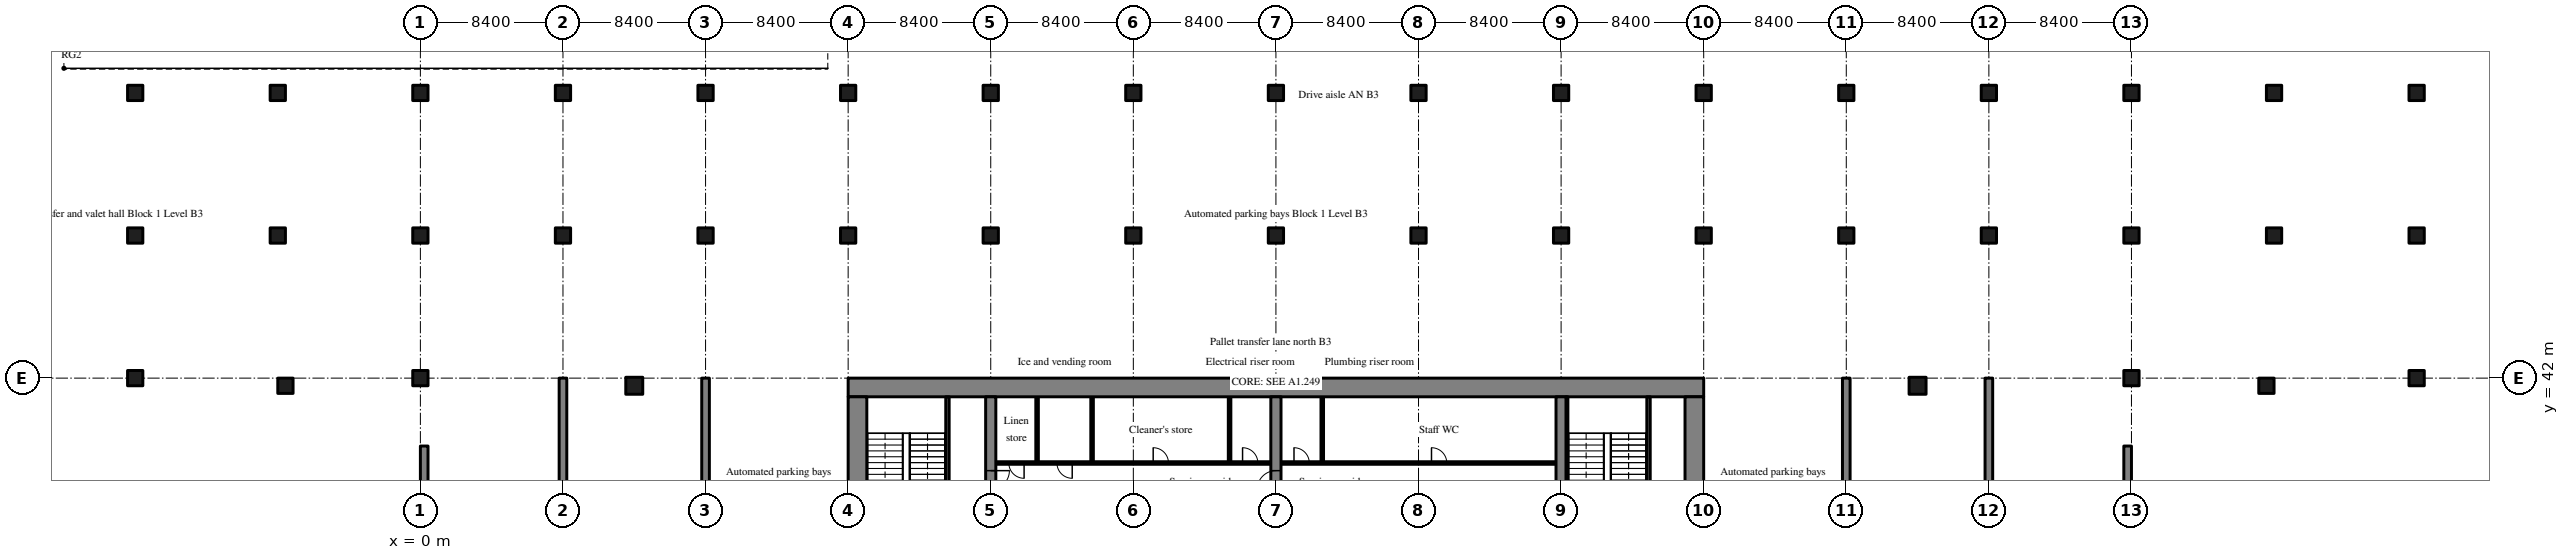
"""IFC4 building model, lengths in metres.
Left out: names, types, materials, properties, quantities, classifications, styles, units other than length and angle.
Written with IfcOpenShell. Run it as: python <this file> out.ifc"""

import sys

from ifc_helpers import new_model, si_unit, direction, frame, frame_2d, origin, origin_2d, place, context, subcontext, project, spatial, rectangle, extrude, source, transform, mapped, element, fill, save


model = new_model("IFC4")
c1 = context("Model", 3, precision=1e-05, world=origin(), true_north=direction((0.0, 1.0)))
c2 = subcontext(c1, "Body", "Model", "MODEL_VIEW")
j1 = project(units=[si_unit("LENGTHUNIT", "METRE"), si_unit("PLANEANGLEUNIT", "RADIAN")], contexts=[c1])
p1 = place(None, origin())
s1 = spatial("IfcSite", under=j1, at=p1, CompositionType="ELEMENT")
p2 = place(p1, origin())
s2 = spatial("IfcBuilding", under=s1, at=p2, CompositionType="ELEMENT")
p3 = place(p2, frame((0.0, 0.0, -13.5)))
s3 = spatial("IfcBuildingStorey", under=s2, at=p3, CompositionType="ELEMENT", Elevation=-13.5)
m1 = source(origin(), c2, "Body", "SweptSolid", [
    extrude(rectangle(XDim=50.4, YDim=1.1, at=frame_2d((25.2, 0.0))), origin(), (0.0, 0.0, 1.0), 4.52),
])
p4 = place(p3, frame((25.2, 41.45, -0.3), z_axis=(0.0, 0.0, 1.0), x_axis=(1.0, 0.0, 0.0)))
e1 = element("IfcWall", 1, at=p4, inside=s3, PredefinedType="SHEAR", context=c2, shape_type="MappedRepresentation", body=[
    mapped(m1, transform((0.0, 0.0, 0.0), scale=1.0)),
])
m2 = source(origin(), c2, "Body", "SweptSolid", [
    extrude(rectangle(XDim=17.8, YDim=1.1, at=frame_2d((8.9, 0.0))), origin(), (0.0, 0.0, 1.0), 4.52),
])
for number, where, z_axis, x_axis in (
    (2, (25.75, 23.1, -0.3), (0.0, 0.0, 1.0), (0.0, 1.0, 0.0)),
    (3, (75.05, 23.1, -0.3), (0.0, 0.0, 1.0), (0.0, 1.0, 0.0)),
):
    element("IfcWall", number, at=place(p3, frame(where, z_axis=z_axis, x_axis=x_axis)), inside=s3, PredefinedType="SHEAR", context=c2, shape_type="MappedRepresentation", body=[
        mapped(m2, transform((0.0, 0.0, 0.0), scale=1.0)),
    ])
m3 = source(origin(), c2, "Body", "SweptSolid", [
    extrude(rectangle(XDim=17.8, YDim=0.6, at=frame_2d((8.9, 0.0))), origin(), (0.0, 0.0, 1.0), 4.52),
])
p5 = place(p3, frame((33.6, 23.1, -0.3), z_axis=(0.0, 0.0, 1.0), x_axis=(0.0, 1.0, 0.0)))
e4 = element("IfcWall", 4, at=p5, inside=s3, PredefinedType="SHEAR", context=c2, shape_type="MappedRepresentation", body=[
    mapped(m3, transform((0.0, 0.0, 0.0), scale=1.0)),
])
m4 = source(origin(), c2, "Body", "SweptSolid", [
    extrude(rectangle(XDim=1.1, YDim=2.1, at=frame_2d((0.55, 1.05))), frame((0.0, 0.31, 0.0), z_axis=(0.0, -1.0, 0.0), x_axis=(1.0, 0.0, 0.0)), (0.0, 0.0, 1.0), 0.62),
])
p6 = place(p5, frame((12.35, 0.0, 0.0)))
e5 = element("IfcOpeningElement", 5, at=p6, cuts=e4, PredefinedType="OPENING", context=c2, shape_type="MappedRepresentation", body=[
    mapped(m4, transform((0.0, 0.0, 0.0), scale=1.0)),
])
p7 = place(p3, frame((50.4, 23.1, -0.3), z_axis=(0.0, 0.0, 1.0), x_axis=(0.0, 1.0, 0.0)))
e6 = element("IfcWall", 6, at=p7, inside=s3, PredefinedType="SHEAR", context=c2, shape_type="MappedRepresentation", body=[
    mapped(m3, transform((0.0, 0.0, 0.0), scale=1.0)),
])
p8 = place(p7, frame((12.35, 0.0, 0.0)))
e7 = element("IfcOpeningElement", 7, at=p8, cuts=e6, PredefinedType="OPENING", context=c2, shape_type="MappedRepresentation", body=[
    mapped(m4, transform((0.0, 0.0, 0.0), scale=1.0)),
])
p9 = place(p3, frame((67.2, 23.1, -0.3), z_axis=(0.0, 0.0, 1.0), x_axis=(0.0, 1.0, 0.0)))
e8 = element("IfcWall", 8, at=p9, inside=s3, PredefinedType="SHEAR", context=c2, shape_type="MappedRepresentation", body=[
    mapped(m3, transform((0.0, 0.0, 0.0), scale=1.0)),
])
m5 = source(origin(), c2, "Body", "SweptSolid", [
    extrude(rectangle(XDim=16.0, YDim=0.45, at=frame_2d((8.0, 0.0))), origin(), (0.0, 0.0, 1.0), 4.52),
])
p10 = place(p3, frame((0.225, 22.0, -0.3), z_axis=(0.0, 0.0, 1.0), x_axis=(0.0, 1.0, 0.0)))
e9 = element("IfcWall", 9, at=p10, inside=s3, PredefinedType="SHEAR", context=c2, shape_type="MappedRepresentation", body=[
    mapped(m5, transform((0.0, 0.0, 0.0), scale=1.0)),
])
m6 = source(origin(), c2, "Body", "SweptSolid", [
    extrude(rectangle(XDim=20.0, YDim=0.45, at=frame_2d((10.0, 0.0))), origin(), (0.0, 0.0, 1.0), 4.52),
])
for number, where, z_axis, x_axis in (
    (10, (8.4, 22.0, -0.3), (0.0, 0.0, 1.0), (0.0, 1.0, 0.0)),
    (11, (16.8, 22.0, -0.3), (0.0, 0.0, 1.0), (0.0, 1.0, 0.0)),
    (12, (84.0, 22.0, -0.3), (0.0, 0.0, 1.0), (0.0, 1.0, 0.0)),
    (13, (92.4, 22.0, -0.3), (0.0, 0.0, 1.0), (0.0, 1.0, 0.0)),
):
    element("IfcWall", number, at=place(p3, frame(where, z_axis=z_axis, x_axis=x_axis)), inside=s3, PredefinedType="SHEAR", context=c2, shape_type="MappedRepresentation", body=[
        mapped(m6, transform((0.0, 0.0, 0.0), scale=1.0)),
    ])
p11 = place(p3, frame((100.575, 22.0, -0.3), z_axis=(0.0, 0.0, 1.0), x_axis=(0.0, 1.0, 0.0)))
e14 = element("IfcWall", 14, at=p11, inside=s3, PredefinedType="SHEAR", context=c2, shape_type="MappedRepresentation", body=[
    mapped(m5, transform((0.0, 0.0, 0.0), scale=1.0)),
])
m7 = source(origin(), c2, "Body", "SweptSolid", [
    extrude(rectangle(XDim=1.0, YDim=1.0, at=origin_2d()), origin(), (0.0, 0.0, 1.0), 4.52),
])
for number, where, z_axis, x_axis in (
    (15, (12.6, 41.55, -0.3), (0.0, 0.0, 1.0), (1.0, 0.0, 0.0)),
    (16, (88.2, 41.55, -0.3), (0.0, 0.0, 1.0), (1.0, 0.0, 0.0)),
):
    element("IfcColumn", number, at=place(p3, frame(where, z_axis=z_axis, x_axis=x_axis)), inside=s3, PredefinedType="COLUMN", context=c2, shape_type="MappedRepresentation", body=[
        mapped(m7, transform((0.0, 0.0, 0.0), scale=1.0)),
    ])
m8 = source(origin(), c2, "Body", "SweptSolid", [
    extrude(rectangle(XDim=0.9, YDim=0.9, at=origin_2d()), origin(), (0.0, 0.0, 1.0), 4.52),
])
for number, where, z_axis, x_axis in (
    (17, (-7.95, 41.55, -0.3), (0.0, 0.0, 1.0), (1.0, 0.0, 0.0)),
    (18, (108.75, 41.55, -0.3), (0.0, 0.0, 1.0), (1.0, 0.0, 0.0)),
    (19, (-16.8, 42.0, -0.3), (0.0, 0.0, 1.0), (1.0, 0.0, 0.0)),
    (20, (-16.8, 50.4, -0.3), (0.0, 0.0, 1.0), (1.0, 0.0, 0.0)),
    (21, (-16.8, 58.8, -0.3), (0.0, 0.0, 1.0), (1.0, 0.0, 0.0)),
    (22, (-8.4, 50.4, -0.3), (0.0, 0.0, 1.0), (1.0, 0.0, 0.0)),
    (23, (-8.4, 58.8, -0.3), (0.0, 0.0, 1.0), (1.0, 0.0, 0.0)),
    (24, (0.0, 42.0, -0.3), (0.0, 0.0, 1.0), (1.0, 0.0, 0.0)),
    (25, (0.0, 50.4, -0.3), (0.0, 0.0, 1.0), (1.0, 0.0, 0.0)),
    (26, (0.0, 58.8, -0.3), (0.0, 0.0, 1.0), (1.0, 0.0, 0.0)),
    (27, (8.4, 50.4, -0.3), (0.0, 0.0, 1.0), (1.0, 0.0, 0.0)),
    (28, (8.4, 58.8, -0.3), (0.0, 0.0, 1.0), (1.0, 0.0, 0.0)),
    (29, (16.8, 50.4, -0.3), (0.0, 0.0, 1.0), (1.0, 0.0, 0.0)),
    (30, (16.8, 58.8, -0.3), (0.0, 0.0, 1.0), (1.0, 0.0, 0.0)),
    (31, (25.2, 50.4, -0.3), (0.0, 0.0, 1.0), (1.0, 0.0, 0.0)),
    (32, (25.2, 58.8, -0.3), (0.0, 0.0, 1.0), (1.0, 0.0, 0.0)),
    (33, (33.6, 50.4, -0.3), (0.0, 0.0, 1.0), (1.0, 0.0, 0.0)),
    (34, (33.6, 58.8, -0.3), (0.0, 0.0, 1.0), (1.0, 0.0, 0.0)),
    (35, (42.0, 50.4, -0.3), (0.0, 0.0, 1.0), (1.0, 0.0, 0.0)),
    (36, (42.0, 58.8, -0.3), (0.0, 0.0, 1.0), (1.0, 0.0, 0.0)),
    (37, (50.4, 50.4, -0.3), (0.0, 0.0, 1.0), (1.0, 0.0, 0.0)),
    (38, (50.4, 58.8, -0.3), (0.0, 0.0, 1.0), (1.0, 0.0, 0.0)),
    (39, (58.8, 50.4, -0.3), (0.0, 0.0, 1.0), (1.0, 0.0, 0.0)),
    (40, (58.8, 58.8, -0.3), (0.0, 0.0, 1.0), (1.0, 0.0, 0.0)),
    (41, (67.2, 50.4, -0.3), (0.0, 0.0, 1.0), (1.0, 0.0, 0.0)),
    (42, (67.2, 58.8, -0.3), (0.0, 0.0, 1.0), (1.0, 0.0, 0.0)),
    (43, (75.6, 50.4, -0.3), (0.0, 0.0, 1.0), (1.0, 0.0, 0.0)),
    (44, (75.6, 58.8, -0.3), (0.0, 0.0, 1.0), (1.0, 0.0, 0.0)),
    (45, (84.0, 50.4, -0.3), (0.0, 0.0, 1.0), (1.0, 0.0, 0.0)),
    (46, (84.0, 58.8, -0.3), (0.0, 0.0, 1.0), (1.0, 0.0, 0.0)),
    (47, (92.4, 50.4, -0.3), (0.0, 0.0, 1.0), (1.0, 0.0, 0.0)),
    (48, (92.4, 58.8, -0.3), (0.0, 0.0, 1.0), (1.0, 0.0, 0.0)),
    (49, (100.8, 42.0, -0.3), (0.0, 0.0, 1.0), (1.0, 0.0, 0.0)),
    (50, (100.8, 50.4, -0.3), (0.0, 0.0, 1.0), (1.0, 0.0, 0.0)),
    (51, (100.8, 58.8, -0.3), (0.0, 0.0, 1.0), (1.0, 0.0, 0.0)),
    (52, (109.2, 50.4, -0.3), (0.0, 0.0, 1.0), (1.0, 0.0, 0.0)),
    (53, (109.2, 58.8, -0.3), (0.0, 0.0, 1.0), (1.0, 0.0, 0.0)),
    (54, (117.6, 42.0, -0.3), (0.0, 0.0, 1.0), (1.0, 0.0, 0.0)),
    (55, (117.6, 50.4, -0.3), (0.0, 0.0, 1.0), (1.0, 0.0, 0.0)),
    (56, (117.6, 58.8, -0.3), (0.0, 0.0, 1.0), (1.0, 0.0, 0.0)),
):
    element("IfcColumn", number, at=place(p3, frame(where, z_axis=z_axis, x_axis=x_axis)), inside=s3, PredefinedType="COLUMN", context=c2, shape_type="MappedRepresentation", body=[
        mapped(m8, transform((0.0, 0.0, 0.0), scale=1.0)),
    ])
m9 = source(origin(), c2, "Body", "SweptSolid", [
    extrude(rectangle(XDim=16.2, YDim=0.15, at=frame_2d((8.1, 0.0))), origin(), (0.0, 0.0, 1.0), 4.22),
])
p12 = place(p3, frame((33.9, 37.0, 0.0), z_axis=(0.0, 0.0, 1.0), x_axis=(1.0, 0.0, 0.0)))
e57 = element("IfcWall", 57, at=p12, inside=s3, PredefinedType="PARTITIONING", context=c2, shape_type="MappedRepresentation", body=[
    mapped(m9, transform((0.0, 0.0, 0.0), scale=1.0)),
])
m10 = source(origin(), c2, "Body", "SweptSolid", [
    extrude(rectangle(XDim=0.9, YDim=2.1, at=frame_2d((0.45, 1.05))), frame((0.0, 0.085, 0.0), z_axis=(0.0, -1.0, 0.0), x_axis=(1.0, 0.0, 0.0)), (0.0, 0.0, 1.0), 0.17),
])
p13 = place(p12, frame((0.765, 0.0, 0.0)))
e58 = element("IfcOpeningElement", 58, at=p13, cuts=e57, PredefinedType="OPENING", context=c2, shape_type="MappedRepresentation", body=[
    mapped(m10, transform((0.0, 0.0, 0.0), scale=1.0)),
])
p14 = place(p12, frame((3.6, 0.0, 0.0)))
e59 = element("IfcOpeningElement", 59, at=p14, cuts=e57, PredefinedType="OPENING", context=c2, shape_type="MappedRepresentation", body=[
    mapped(m10, transform((0.0, 0.0, 0.0), scale=1.0)),
])
p15 = place(p12, frame((9.27, 0.0, 0.0)))
e60 = element("IfcOpeningElement", 60, at=p15, cuts=e57, PredefinedType="OPENING", context=c2, shape_type="MappedRepresentation", body=[
    mapped(m10, transform((0.0, 0.0, 0.0), scale=1.0)),
])
p16 = place(p12, frame((14.535, 0.0, 0.0)))
e61 = element("IfcOpeningElement", 61, at=p16, cuts=e57, PredefinedType="OPENING", context=c2, shape_type="MappedRepresentation", body=[
    mapped(m10, transform((0.0, 0.0, 0.0), scale=1.0)),
])
m11 = source(origin(), c2, "Body", "SweptSolid", [
    extrude(rectangle(XDim=3.9, YDim=0.15, at=frame_2d((1.95, 0.0))), origin(), (0.0, 0.0, 1.0), 4.22),
])
for number, where, z_axis, x_axis in (
    (62, (36.33, 37.0, 0.0), (0.0, 0.0, 1.0), (0.0, 1.0, 0.0)),
    (63, (39.57, 37.0, 0.0), (0.0, 0.0, 1.0), (0.0, 1.0, 0.0)),
    (64, (47.67, 37.0, 0.0), (0.0, 0.0, 1.0), (0.0, 1.0, 0.0)),
):
    element("IfcWall", number, at=place(p3, frame(where, z_axis=z_axis, x_axis=x_axis)), inside=s3, PredefinedType="PARTITIONING", context=c2, shape_type="MappedRepresentation", body=[
        mapped(m11, transform((0.0, 0.0, 0.0), scale=1.0)),
    ])
m12 = source(origin(), c2, "Body", "SweptSolid", [
    extrude(rectangle(XDim=16.2, YDim=0.15, at=frame_2d((8.1, 0.0))), origin(), (0.0, 0.0, 1.0), 4.22),
])
p17 = place(p3, frame((66.9, 37.0, 0.0), z_axis=(0.0, 0.0, 1.0), x_axis=(-1.0, 0.0, 0.0)))
e65 = element("IfcWall", 65, at=p17, inside=s3, PredefinedType="PARTITIONING", context=c2, shape_type="MappedRepresentation", body=[
    mapped(m12, transform((0.0, 0.0, 0.0), scale=1.0)),
])
p18 = place(p17, frame((6.435, 0.0, 0.0)))
e66 = element("IfcOpeningElement", 66, at=p18, cuts=e65, PredefinedType="OPENING", context=c2, shape_type="MappedRepresentation", body=[
    mapped(m10, transform((0.0, 0.0, 0.0), scale=1.0)),
])
p19 = place(p17, frame((14.535, 0.0, 0.0)))
e67 = element("IfcOpeningElement", 67, at=p19, cuts=e65, PredefinedType="OPENING", context=c2, shape_type="MappedRepresentation", body=[
    mapped(m10, transform((0.0, 0.0, 0.0), scale=1.0)),
])
p20 = place(p3, frame((53.13, 37.0, 0.0), z_axis=(0.0, 0.0, 1.0), x_axis=(0.0, 1.0, 0.0)))
e68 = element("IfcWall", 68, at=p20, inside=s3, PredefinedType="PARTITIONING", context=c2, shape_type="MappedRepresentation", body=[
    mapped(m11, transform((0.0, 0.0, 0.0), scale=1.0)),
])
m13 = source(origin(), c2, "Body", "SweptSolid", [
    extrude(rectangle(XDim=7.3, YDim=0.2, at=frame_2d((3.65, 0.0))), origin(), (0.0, 0.0, 1.0), 4.52),
])
p21 = place(p3, frame((31.05, 33.6, -0.3), z_axis=(0.0, 0.0, 1.0), x_axis=(0.0, 1.0, 0.0)))
e69 = element("IfcWall", 69, at=p21, inside=s3, PredefinedType="SOLIDWALL", context=c2, shape_type="MappedRepresentation", body=[
    mapped(m13, transform((0.0, 0.0, 0.0), scale=1.0)),
])
m14 = source(origin(), c2, "Body", "SweptSolid", [
    extrude(rectangle(XDim=1.2, YDim=2.1, at=frame_2d((0.6, 1.05))), frame((0.0, 0.11, 0.0), z_axis=(0.0, -1.0, 0.0), x_axis=(1.0, 0.0, 0.0)), (0.0, 0.0, 1.0), 0.22),
])
p22 = place(p21, frame((0.1, 0.0, 0.0)))
e70 = element("IfcOpeningElement", 70, at=p22, cuts=e69, PredefinedType="OPENING", context=c2, shape_type="MappedRepresentation", body=[
    mapped(m14, transform((0.0, 0.0, 0.0), scale=1.0)),
])
p23 = place(p3, frame((72.35, 33.6, -0.3), z_axis=(0.0, 0.0, 1.0), x_axis=(0.0, 1.0, 0.0)))
e71 = element("IfcWall", 71, at=p23, inside=s3, PredefinedType="SOLIDWALL", context=c2, shape_type="MappedRepresentation", body=[
    mapped(m13, transform((0.0, 0.0, 0.0), scale=1.0)),
])
p24 = place(p23, frame((0.1, 0.0, 0.0)))
e72 = element("IfcOpeningElement", 72, at=p24, cuts=e71, PredefinedType="OPENING", context=c2, shape_type="MappedRepresentation", body=[
    mapped(m14, transform((0.0, 0.0, 0.0), scale=1.0)),
])
m15 = source(origin(), c2, "Body", "SweptSolid", [
    extrude(rectangle(XDim=8.1, YDim=0.1, at=frame_2d((4.05, 0.0))), origin(), (0.0, 0.0, 1.0), 4.52),
])
p25 = place(p3, frame((67.55, 32.8, -0.3), z_axis=(0.0, 0.0, 1.0), x_axis=(0.0, 1.0, 0.0)))
e73 = element("IfcWall", 73, at=p25, inside=s3, PredefinedType="SOLIDWALL", context=c2, shape_type="MappedRepresentation", body=[
    mapped(m15, transform((0.0, 0.0, 0.0), scale=1.0)),
])
m16 = source(origin(), c2, "Body", "SweptSolid", [
    extrude(rectangle(XDim=0.9, YDim=2.1, at=frame_2d((0.45, 1.05))), frame((0.0, 0.025, 0.0), z_axis=(0.0, -1.0, 0.0), x_axis=(1.0, 0.0, 0.0)), (0.0, 0.0, 1.0), 0.05),
])
p26 = place(p13, origin())
e74 = element("IfcDoor", 74, at=p26, inside=s3, OperationType="SINGLE_SWING_RIGHT", PredefinedType="DOOR", context=c2, shape_type="MappedRepresentation", body=[
    mapped(m16, transform((0.0, 0.0, 0.0), scale=1.0)),
])
fill(e58, e74)
p27 = place(p14, origin())
e75 = element("IfcDoor", 75, at=p27, inside=s3, OperationType="SINGLE_SWING_RIGHT", PredefinedType="DOOR", context=c2, shape_type="MappedRepresentation", body=[
    mapped(m16, transform((0.0, 0.0, 0.0), scale=1.0)),
])
fill(e59, e75)
p28 = place(p15, origin())
e76 = element("IfcDoor", 76, at=p28, inside=s3, OperationType="SINGLE_SWING_LEFT", PredefinedType="DOOR", context=c2, shape_type="MappedRepresentation", body=[
    mapped(m16, transform((0.0, 0.0, 0.0), scale=1.0)),
])
fill(e60, e76)
p29 = place(p16, origin())
e77 = element("IfcDoor", 77, at=p29, inside=s3, OperationType="SINGLE_SWING_LEFT", PredefinedType="DOOR", context=c2, shape_type="MappedRepresentation", body=[
    mapped(m16, transform((0.0, 0.0, 0.0), scale=1.0)),
])
fill(e61, e77)
p30 = place(p18, origin())
e78 = element("IfcDoor", 78, at=p30, inside=s3, OperationType="SINGLE_SWING_RIGHT", PredefinedType="DOOR", context=c2, shape_type="MappedRepresentation", body=[
    mapped(m16, transform((0.0, 0.0, 0.0), scale=1.0)),
])
fill(e66, e78)
p31 = place(p19, origin())
e79 = element("IfcDoor", 79, at=p31, inside=s3, OperationType="SINGLE_SWING_RIGHT", PredefinedType="DOOR", context=c2, shape_type="MappedRepresentation", body=[
    mapped(m16, transform((0.0, 0.0, 0.0), scale=1.0)),
])
fill(e67, e79)
m17 = source(origin(), c2, "Body", "SweptSolid", [
    extrude(rectangle(XDim=1.1, YDim=2.1, at=frame_2d((0.55, 1.05))), frame((0.0, 0.025, 0.0), z_axis=(0.0, -1.0, 0.0), x_axis=(1.0, 0.0, 0.0)), (0.0, 0.0, 1.0), 0.05),
])
p32 = place(p6, origin())
e80 = element("IfcDoor", 80, at=p32, inside=s3, OperationType="SINGLE_SWING_RIGHT", PredefinedType="DOOR", context=c2, shape_type="MappedRepresentation", body=[
    mapped(m17, transform((0.0, 0.0, 0.0), scale=1.0)),
])
fill(e5, e80)
p33 = place(p8, origin())
e81 = element("IfcDoor", 81, at=p33, inside=s3, OperationType="SINGLE_SWING_LEFT", PredefinedType="DOOR", context=c2, shape_type="MappedRepresentation", body=[
    mapped(m17, transform((0.0, 0.0, 0.0), scale=1.0)),
])
fill(e7, e81)
save(model, sys.argv[1])
